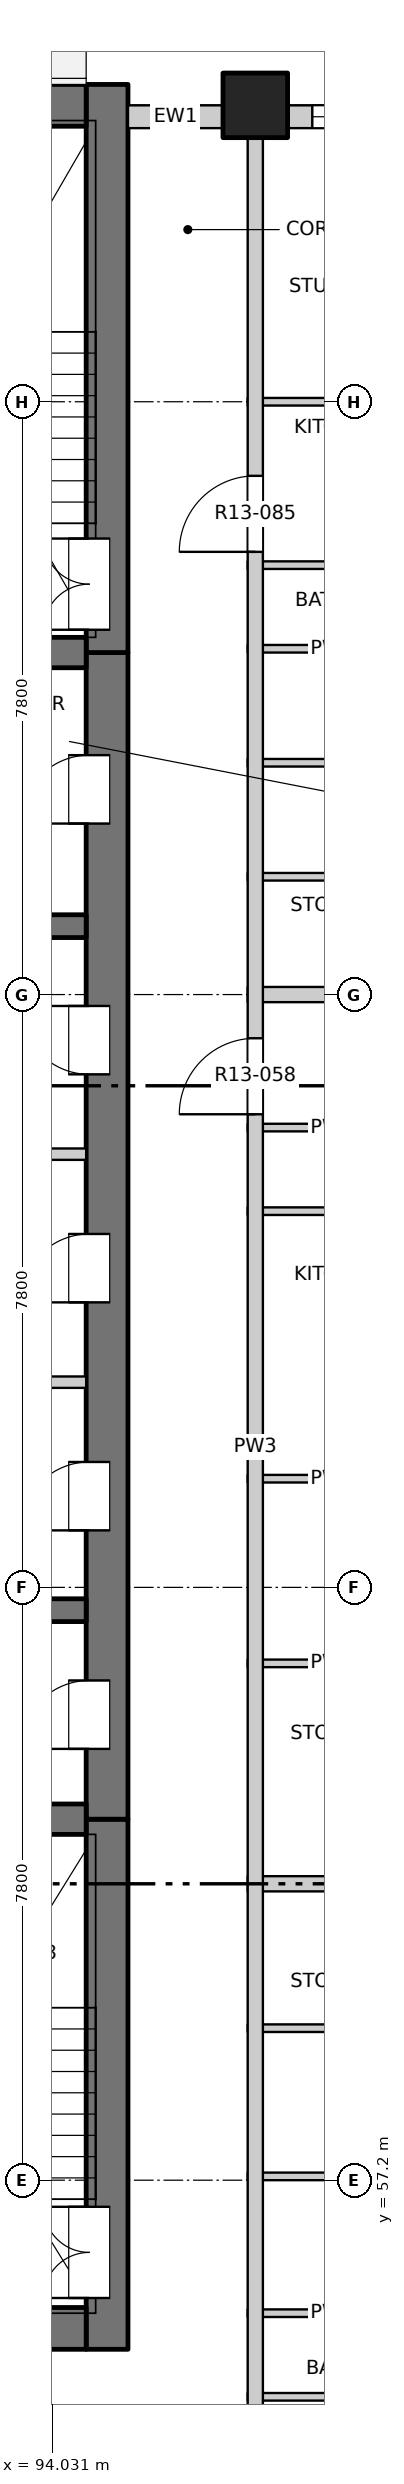
"""IFC4 building model, lengths in metres.
Left out: names, types, materials, properties, quantities, classifications, styles, units other than length and angle.
Written with IfcOpenShell. Run it as: python <this file> out.ifc"""

import sys

from ifc_helpers import new_model, si_unit, direction, frame, frame_2d, origin, origin_2d, place, context, subcontext, project, spatial, rectangle, extrude, element, fill, save


model = new_model("IFC4")
c1 = context("Model", 3, precision=1e-05, world=origin(), true_north=direction((0.0, 1.0)))
c2 = subcontext(c1, "Body", "Model", "MODEL_VIEW")
j1 = project(units=[si_unit("LENGTHUNIT", "METRE"), si_unit("PLANEANGLEUNIT", "RADIAN")], contexts=[c1])
p1 = place(None, origin())
s1 = spatial("IfcSite", under=j1, at=p1, CompositionType="ELEMENT")
p2 = place(p1, origin())
s2 = spatial("IfcBuilding", under=s1, at=p2, CompositionType="ELEMENT")
p3 = place(p2, frame((0.0, 0.0, 140.7)))
s3 = spatial("IfcBuildingStorey", under=s2, at=p3, CompositionType="ELEMENT", Elevation=140.7)
p4 = place(p3, frame((96.7, 84.5, -0.25), z_axis=(0.0, 0.0, 1.0), x_axis=(1.0, 0.0, 0.0)))
e1 = element("IfcColumn", 1, at=p4, inside=s3, PredefinedType="COLUMN", context=c2, shape_type="SweptSolid", body=[
    extrude(rectangle(XDim=0.85, YDim=0.85, at=origin_2d()), origin(), (0.0, 0.0, 1.0), 3.35),
])
p5 = place(p3, frame((94.75, 54.975, -0.25), z_axis=(0.0, 0.0, 1.0), x_axis=(0.0, 1.0, 0.0)))
e2 = element("IfcWall", 2, at=p5, inside=s3, PredefinedType="SOLIDWALL", context=c2, shape_type="SweptSolid", body=[
    extrude(rectangle(XDim=6.975, YDim=0.55, at=frame_2d((3.487, 0.0))), origin(), (0.0, 0.0, 1.0), 3.35),
])
p6 = place(p5, frame((0.675, 0.0, 0.25)))
e3 = element("IfcOpeningElement", 3, at=p6, cuts=e2, PredefinedType="OPENING", context=c2, shape_type="SweptSolid", body=[
    extrude(rectangle(XDim=1.2, YDim=2.1, at=frame_2d((0.6, 1.05))), frame((0.0, 0.285, 0.0), z_axis=(0.0, -1.0, 0.0), x_axis=(1.0, 0.0, 0.0)), (0.0, 0.0, 1.0), 0.57),
])
p7 = place(p3, frame((94.75, 61.95, -0.25), z_axis=(0.0, 0.0, 1.0), x_axis=(0.0, 1.0, 0.0)))
e4 = element("IfcWall", 4, at=p7, inside=s3, PredefinedType="SOLIDWALL", context=c2, shape_type="SweptSolid", body=[
    extrude(rectangle(XDim=15.35, YDim=0.55, at=frame_2d((7.675, 0.0))), origin(), (0.0, 0.0, 1.0), 3.35),
])
p8 = place(p7, frame((0.925, 0.0, 0.25)))
e5 = element("IfcOpeningElement", 5, at=p8, cuts=e4, PredefinedType="OPENING", context=c2, shape_type="SweptSolid", body=[
    extrude(rectangle(XDim=0.9, YDim=2.1, at=frame_2d((0.45, 1.05))), frame((0.0, 0.285, 0.0), z_axis=(0.0, -1.0, 0.0), x_axis=(1.0, 0.0, 0.0)), (0.0, 0.0, 1.0), 0.57),
])
p9 = place(p7, frame((3.8, 0.0, 0.25)))
e6 = element("IfcOpeningElement", 6, at=p9, cuts=e4, PredefinedType="OPENING", context=c2, shape_type="SweptSolid", body=[
    extrude(rectangle(XDim=0.9, YDim=2.1, at=frame_2d((0.45, 1.05))), frame((0.0, 0.285, 0.0), z_axis=(0.0, -1.0, 0.0), x_axis=(1.0, 0.0, 0.0)), (0.0, 0.0, 1.0), 0.57),
])
p10 = place(p7, frame((6.8, 0.0, 0.25)))
e7 = element("IfcOpeningElement", 7, at=p10, cuts=e4, PredefinedType="OPENING", context=c2, shape_type="SweptSolid", body=[
    extrude(rectangle(XDim=0.9, YDim=2.1, at=frame_2d((0.45, 1.05))), frame((0.0, 0.285, 0.0), z_axis=(0.0, -1.0, 0.0), x_axis=(1.0, 0.0, 0.0)), (0.0, 0.0, 1.0), 0.57),
])
p11 = place(p7, frame((9.8, 0.0, 0.25)))
e8 = element("IfcOpeningElement", 8, at=p11, cuts=e4, PredefinedType="OPENING", context=c2, shape_type="SweptSolid", body=[
    extrude(rectangle(XDim=0.9, YDim=2.1, at=frame_2d((0.45, 1.05))), frame((0.0, 0.285, 0.0), z_axis=(0.0, -1.0, 0.0), x_axis=(1.0, 0.0, 0.0)), (0.0, 0.0, 1.0), 0.57),
])
p12 = place(p7, frame((13.1, 0.0, 0.25)))
e9 = element("IfcOpeningElement", 9, at=p12, cuts=e4, PredefinedType="OPENING", context=c2, shape_type="SweptSolid", body=[
    extrude(rectangle(XDim=0.9, YDim=2.1, at=frame_2d((0.45, 1.05))), frame((0.0, 0.285, 0.0), z_axis=(0.0, -1.0, 0.0), x_axis=(1.0, 0.0, 0.0)), (0.0, 0.0, 1.0), 0.57),
])
p13 = place(p3, frame((94.75, 77.3, -0.25), z_axis=(0.0, 0.0, 1.0), x_axis=(0.0, 1.0, 0.0)))
e10 = element("IfcWall", 10, at=p13, inside=s3, PredefinedType="SOLIDWALL", context=c2, shape_type="SweptSolid", body=[
    extrude(rectangle(XDim=7.475, YDim=0.55, at=frame_2d((3.737, 0.0))), origin(), (0.0, 0.0, 1.0), 3.35),
])
p14 = place(p13, frame((0.3, 0.0, 0.25)))
e11 = element("IfcOpeningElement", 11, at=p14, cuts=e10, PredefinedType="OPENING", context=c2, shape_type="SweptSolid", body=[
    extrude(rectangle(XDim=1.2, YDim=2.1, at=frame_2d((0.6, 1.05))), frame((0.0, 0.285, 0.0), z_axis=(0.0, -1.0, 0.0), x_axis=(1.0, 0.0, 0.0)), (0.0, 0.0, 1.0), 0.57),
])
p15 = place(p3, frame((75.525, 55.25, -0.25), z_axis=(0.0, 0.0, 1.0), x_axis=(1.0, 0.0, 0.0)))
e12 = element("IfcWall", 12, at=p15, inside=s3, PredefinedType="SOLIDWALL", context=c2, shape_type="SweptSolid", body=[
    extrude(rectangle(XDim=18.95, YDim=0.55, at=frame_2d((9.475, 0.0))), origin(), (0.0, 0.0, 1.0), 3.35),
])
p16 = place(p15, frame((8.725, 0.0, 0.25)))
e13 = element("IfcOpeningElement", 13, at=p16, cuts=e12, PredefinedType="OPENING", context=c2, shape_type="SweptSolid", body=[
    extrude(rectangle(XDim=1.5, YDim=2.1, at=frame_2d((0.75, 1.05))), frame((0.0, 0.285, 0.0), z_axis=(0.0, -1.0, 0.0), x_axis=(1.0, 0.0, 0.0)), (0.0, 0.0, 1.0), 0.57),
])
p17 = place(p3, frame((75.525, 84.5, -0.25), z_axis=(0.0, 0.0, 1.0), x_axis=(1.0, 0.0, 0.0)))
e14 = element("IfcWall", 14, at=p17, inside=s3, PredefinedType="SOLIDWALL", context=c2, shape_type="SweptSolid", body=[
    extrude(rectangle(XDim=18.95, YDim=0.55, at=frame_2d((9.475, 0.0))), origin(), (0.0, 0.0, 1.0), 3.35),
])
p18 = place(p3, frame((90.7, 61.95, -0.25), z_axis=(0.0, 0.0, 1.0), x_axis=(1.0, 0.0, 0.0)))
e15 = element("IfcWall", 15, at=p18, inside=s3, PredefinedType="SOLIDWALL", context=c2, shape_type="SweptSolid", body=[
    extrude(rectangle(XDim=3.775, YDim=0.4, at=frame_2d((1.888, 0.0))), origin(), (0.0, 0.0, 1.0), 3.35),
])
for number, where, z_axis, x_axis in (
    (16, (90.7, 64.7, -0.25), (0.0, 0.0, 1.0), (1.0, 0.0, 0.0)),
    (17, (90.7, 73.7, -0.25), (0.0, 0.0, 1.0), (1.0, 0.0, 0.0)),
):
    element("IfcWall", number, at=place(p3, frame(where, z_axis=z_axis, x_axis=x_axis)), inside=s3, PredefinedType="SOLIDWALL", context=c2, shape_type="SweptSolid", body=[
        extrude(rectangle(XDim=3.775, YDim=0.3, at=frame_2d((1.888, 0.0))), origin(), (0.0, 0.0, 1.0), 3.35),
    ])
p19 = place(p3, frame((90.7, 77.3, -0.25), z_axis=(0.0, 0.0, 1.0), x_axis=(1.0, 0.0, 0.0)))
e18 = element("IfcWall", 18, at=p19, inside=s3, PredefinedType="SOLIDWALL", context=c2, shape_type="SweptSolid", body=[
    extrude(rectangle(XDim=3.775, YDim=0.4, at=frame_2d((1.888, 0.0))), origin(), (0.0, 0.0, 1.0), 3.35),
])
p20 = place(p3, frame((95.025, 84.35, 0.0), z_axis=(0.0, 0.0, 1.0), x_axis=(1.0, 0.0, 0.0)))
e19 = element("IfcWall", 19, at=p20, inside=s3, PredefinedType="SOLIDWALL", context=c2, shape_type="SweptSolid", body=[
    extrude(rectangle(XDim=1.25, YDim=0.3, at=frame_2d((0.625, 0.0))), origin(), (0.0, 0.0, 1.0), 3.1),
])
p21 = place(p3, frame((97.125, 84.35, 0.0), z_axis=(0.0, 0.0, 1.0), x_axis=(1.0, 0.0, 0.0)))
e20 = element("IfcWall", 20, at=p21, inside=s3, PredefinedType="SOLIDWALL", context=c2, shape_type="SweptSolid", body=[
    extrude(rectangle(XDim=3.475, YDim=0.3, at=frame_2d((1.738, 0.0))), origin(), (0.0, 0.0, 1.0), 3.1),
])
p22 = place(p21, frame((0.325, 0.0, 0.9)))
e21 = element("IfcOpeningElement", 21, at=p22, cuts=e20, PredefinedType="OPENING", context=c2, shape_type="SweptSolid", body=[
    extrude(rectangle(XDim=2.4, YDim=1.8, at=frame_2d((1.2, 0.9))), frame((0.0, 0.16, 0.0), z_axis=(0.0, -1.0, 0.0), x_axis=(1.0, 0.0, 0.0)), (0.0, 0.0, 1.0), 0.32),
])
for number, where, z_axis, x_axis in (
    (22, (96.6, 54.35, 0.0), (0.0, 0.0, 1.0), (1.0, 0.0, 0.0)),
    (23, (96.6, 55.45, 0.0), (0.0, 0.0, 1.0), (1.0, 0.0, 0.0)),
    (24, (96.6, 57.25, 0.0), (0.0, 0.0, 1.0), (1.0, 0.0, 0.0)),
    (25, (96.6, 59.2, 0.0), (0.0, 0.0, 1.0), (1.0, 0.0, 0.0)),
):
    element("IfcWall", number, at=place(p3, frame(where, z_axis=z_axis, x_axis=x_axis)), inside=s3, PredefinedType="PARTITIONING", context=c2, shape_type="SweptSolid", body=[
        extrude(rectangle(XDim=2.22, YDim=0.1, at=frame_2d((1.11, 0.0))), origin(), (0.0, 0.0, 1.0), 3.1),
    ])
p23 = place(p3, frame((96.6, 61.1, 0.0), z_axis=(0.0, 0.0, 1.0), x_axis=(1.0, 0.0, 0.0)))
e26 = element("IfcWall", 26, at=p23, inside=s3, PredefinedType="PARTITIONING", context=c2, shape_type="SweptSolid", body=[
    extrude(rectangle(XDim=7.6, YDim=0.2, at=frame_2d((3.8, 0.0))), origin(), (0.0, 0.0, 1.0), 3.1),
])
for number, where, z_axis, x_axis in (
    (27, (96.6, 64.0, 0.0), (0.0, 0.0, 1.0), (1.0, 0.0, 0.0)),
    (28, (96.6, 66.43, 0.0), (0.0, 0.0, 1.0), (1.0, 0.0, 0.0)),
):
    element("IfcWall", number, at=place(p3, frame(where, z_axis=z_axis, x_axis=x_axis)), inside=s3, PredefinedType="PARTITIONING", context=c2, shape_type="SweptSolid", body=[
        extrude(rectangle(XDim=2.22, YDim=0.1, at=frame_2d((1.11, 0.0))), origin(), (0.0, 0.0, 1.0), 3.1),
    ])
p24 = place(p3, frame((90.7, 67.7, 0.0), z_axis=(0.0, 0.0, 1.0), x_axis=(1.0, 0.0, 0.0)))
e29 = element("IfcWall", 29, at=p24, inside=s3, PredefinedType="PARTITIONING", context=c2, shape_type="SweptSolid", body=[
    extrude(rectangle(XDim=3.775, YDim=0.15, at=frame_2d((1.887, 0.0))), origin(), (0.0, 0.0, 1.0), 3.1),
])
p25 = place(p3, frame((96.6, 69.95, 0.0), z_axis=(0.0, 0.0, 1.0), x_axis=(1.0, 0.0, 0.0)))
e30 = element("IfcWall", 30, at=p25, inside=s3, PredefinedType="PARTITIONING", context=c2, shape_type="SweptSolid", body=[
    extrude(rectangle(XDim=2.22, YDim=0.1, at=frame_2d((1.11, 0.0))), origin(), (0.0, 0.0, 1.0), 3.1),
])
p26 = place(p3, frame((90.7, 70.7, 0.0), z_axis=(0.0, 0.0, 1.0), x_axis=(1.0, 0.0, 0.0)))
e31 = element("IfcWall", 31, at=p26, inside=s3, PredefinedType="PARTITIONING", context=c2, shape_type="SweptSolid", body=[
    extrude(rectangle(XDim=3.775, YDim=0.15, at=frame_2d((1.887, 0.0))), origin(), (0.0, 0.0, 1.0), 3.1),
])
p27 = place(p3, frame((96.6, 71.05, 0.0), z_axis=(0.0, 0.0, 1.0), x_axis=(1.0, 0.0, 0.0)))
e32 = element("IfcWall", 32, at=p27, inside=s3, PredefinedType="PARTITIONING", context=c2, shape_type="SweptSolid", body=[
    extrude(rectangle(XDim=2.22, YDim=0.1, at=frame_2d((1.11, 0.0))), origin(), (0.0, 0.0, 1.0), 3.1),
])
p28 = place(p3, frame((96.6, 72.8, 0.0), z_axis=(0.0, 0.0, 1.0), x_axis=(1.0, 0.0, 0.0)))
e33 = element("IfcWall", 33, at=p28, inside=s3, PredefinedType="PARTITIONING", context=c2, shape_type="SweptSolid", body=[
    extrude(rectangle(XDim=7.6, YDim=0.2, at=frame_2d((3.8, 0.0))), origin(), (0.0, 0.0, 1.0), 3.1),
])
for number, where, z_axis, x_axis in (
    (34, (96.6, 74.35, 0.0), (0.0, 0.0, 1.0), (1.0, 0.0, 0.0)),
    (35, (96.6, 75.85, 0.0), (0.0, 0.0, 1.0), (1.0, 0.0, 0.0)),
    (36, (96.6, 77.35, 0.0), (0.0, 0.0, 1.0), (1.0, 0.0, 0.0)),
    (37, (96.6, 78.45, 0.0), (0.0, 0.0, 1.0), (1.0, 0.0, 0.0)),
):
    element("IfcWall", number, at=place(p3, frame(where, z_axis=z_axis, x_axis=x_axis)), inside=s3, PredefinedType="PARTITIONING", context=c2, shape_type="SweptSolid", body=[
        extrude(rectangle(XDim=2.22, YDim=0.1, at=frame_2d((1.11, 0.0))), origin(), (0.0, 0.0, 1.0), 3.1),
    ])
p29 = place(p3, frame((96.6, 80.6, 0.0), z_axis=(0.0, 0.0, 1.0), x_axis=(1.0, 0.0, 0.0)))
e38 = element("IfcWall", 38, at=p29, inside=s3, PredefinedType="PARTITIONING", context=c2, shape_type="SweptSolid", body=[
    extrude(rectangle(XDim=7.6, YDim=0.1, at=frame_2d((3.8, 0.0))), origin(), (0.0, 0.0, 1.0), 3.1),
])
p30 = place(p29, frame((2.51, 0.0, 0.0)))
e39 = element("IfcOpeningElement", 39, at=p30, cuts=e38, PredefinedType="OPENING", context=c2, shape_type="SweptSolid", body=[
    extrude(rectangle(XDim=0.9, YDim=2.1, at=frame_2d((0.45, 1.05))), frame((0.0, 0.06, 0.0), z_axis=(0.0, -1.0, 0.0), x_axis=(1.0, 0.0, 0.0)), (0.0, 0.0, 1.0), 0.12),
])
p31 = place(p3, frame((96.7, 49.5, 0.0), z_axis=(0.0, 0.0, 1.0), x_axis=(0.0, 1.0, 0.0)))
e40 = element("IfcWall", 40, at=p31, inside=s3, PredefinedType="PARTITIONING", context=c2, shape_type="SweptSolid", body=[
    extrude(rectangle(XDim=34.7, YDim=0.2, at=frame_2d((17.35, 0.0))), origin(), (0.0, 0.0, 1.0), 3.1),
])
p32 = place(p31, frame((3.675, 0.0, 0.0)))
e41 = element("IfcOpeningElement", 41, at=p32, cuts=e40, PredefinedType="OPENING", context=c2, shape_type="SweptSolid", body=[
    extrude(rectangle(XDim=1.0, YDim=2.1, at=frame_2d((0.5, 1.05))), frame((0.0, 0.11, 0.0), z_axis=(0.0, -1.0, 0.0), x_axis=(1.0, 0.0, 0.0)), (0.0, 0.0, 1.0), 0.22),
])
p33 = place(p31, frame((21.725, 0.0, 0.0)))
e42 = element("IfcOpeningElement", 42, at=p33, cuts=e40, PredefinedType="OPENING", context=c2, shape_type="SweptSolid", body=[
    extrude(rectangle(XDim=1.0, YDim=2.1, at=frame_2d((0.5, 1.05))), frame((0.0, 0.11, 0.0), z_axis=(0.0, -1.0, 0.0), x_axis=(1.0, 0.0, 0.0)), (0.0, 0.0, 1.0), 0.22),
])
p34 = place(p31, frame((29.125, 0.0, 0.0)))
e43 = element("IfcOpeningElement", 43, at=p34, cuts=e40, PredefinedType="OPENING", context=c2, shape_type="SweptSolid", body=[
    extrude(rectangle(XDim=1.0, YDim=2.1, at=frame_2d((0.5, 1.05))), frame((0.0, 0.11, 0.0), z_axis=(0.0, -1.0, 0.0), x_axis=(1.0, 0.0, 0.0)), (0.0, 0.0, 1.0), 0.22),
])
p35 = place(p22, origin())
e44 = element("IfcWindow", 44, at=p35, inside=s3, PartitioningType="DOUBLE_PANEL_VERTICAL", PredefinedType="WINDOW", context=c2, shape_type="SweptSolid", body=[
    extrude(rectangle(XDim=2.4, YDim=1.8, at=frame_2d((1.2, 0.9))), frame((0.0, 0.03, 0.0), z_axis=(0.0, -1.0, 0.0), x_axis=(1.0, 0.0, 0.0)), (0.0, 0.0, 1.0), 0.06),
])
fill(e21, e44)
p36 = place(p6, origin())
e45 = element("IfcDoor", 45, at=p36, inside=s3, OperationType="DOUBLE_DOOR_SINGLE_SWING", PredefinedType="DOOR", context=c2, shape_type="SweptSolid", body=[
    extrude(rectangle(XDim=1.2, YDim=2.1, at=frame_2d((0.6, 1.05))), frame((0.0, 0.26, 0.0), z_axis=(0.0, -1.0, 0.0), x_axis=(1.0, 0.0, 0.0)), (0.0, 0.0, 1.0), 0.05),
])
fill(e3, e45)
p37 = place(p8, origin())
e46 = element("IfcDoor", 46, at=p37, inside=s3, OperationType="SINGLE_SWING_LEFT", PredefinedType="DOOR", context=c2, shape_type="SweptSolid", body=[
    extrude(rectangle(XDim=0.9, YDim=2.1, at=frame_2d((0.45, 1.05))), frame((0.0, 0.26, 0.0), z_axis=(0.0, -1.0, 0.0), x_axis=(1.0, 0.0, 0.0)), (0.0, 0.0, 1.0), 0.05),
])
fill(e5, e46)
p38 = place(p9, origin())
e47 = element("IfcDoor", 47, at=p38, inside=s3, OperationType="SINGLE_SWING_LEFT", PredefinedType="DOOR", context=c2, shape_type="SweptSolid", body=[
    extrude(rectangle(XDim=0.9, YDim=2.1, at=frame_2d((0.45, 1.05))), frame((0.0, 0.26, 0.0), z_axis=(0.0, -1.0, 0.0), x_axis=(1.0, 0.0, 0.0)), (0.0, 0.0, 1.0), 0.05),
])
fill(e6, e47)
p39 = place(p10, origin())
e48 = element("IfcDoor", 48, at=p39, inside=s3, OperationType="SINGLE_SWING_LEFT", PredefinedType="DOOR", context=c2, shape_type="SweptSolid", body=[
    extrude(rectangle(XDim=0.9, YDim=2.1, at=frame_2d((0.45, 1.05))), frame((0.0, 0.26, 0.0), z_axis=(0.0, -1.0, 0.0), x_axis=(1.0, 0.0, 0.0)), (0.0, 0.0, 1.0), 0.05),
])
fill(e7, e48)
p40 = place(p33, origin())
e49 = element("IfcDoor", 49, at=p40, inside=s3, OperationType="SINGLE_SWING_LEFT", PredefinedType="DOOR", context=c2, shape_type="SweptSolid", body=[
    extrude(rectangle(XDim=1.0, YDim=2.1, at=frame_2d((0.5, 1.05))), frame((0.0, 0.025, 0.0), z_axis=(0.0, -1.0, 0.0), x_axis=(1.0, 0.0, 0.0)), (0.0, 0.0, 1.0), 0.05),
])
fill(e42, e49)
p41 = place(p11, origin())
e50 = element("IfcDoor", 50, at=p41, inside=s3, OperationType="SINGLE_SWING_RIGHT", PredefinedType="DOOR", context=c2, shape_type="SweptSolid", body=[
    extrude(rectangle(XDim=0.9, YDim=2.1, at=frame_2d((0.45, 1.05))), frame((0.0, 0.26, 0.0), z_axis=(0.0, -1.0, 0.0), x_axis=(1.0, 0.0, 0.0)), (0.0, 0.0, 1.0), 0.05),
])
fill(e8, e50)
p42 = place(p12, origin())
e51 = element("IfcDoor", 51, at=p42, inside=s3, OperationType="SINGLE_SWING_LEFT", PredefinedType="DOOR", context=c2, shape_type="SweptSolid", body=[
    extrude(rectangle(XDim=0.9, YDim=2.1, at=frame_2d((0.45, 1.05))), frame((0.0, 0.26, 0.0), z_axis=(0.0, -1.0, 0.0), x_axis=(1.0, 0.0, 0.0)), (0.0, 0.0, 1.0), 0.05),
])
fill(e9, e51)
p43 = place(p14, origin())
e52 = element("IfcDoor", 52, at=p43, inside=s3, OperationType="DOUBLE_DOOR_SINGLE_SWING", PredefinedType="DOOR", context=c2, shape_type="SweptSolid", body=[
    extrude(rectangle(XDim=1.2, YDim=2.1, at=frame_2d((0.6, 1.05))), frame((0.0, 0.26, 0.0), z_axis=(0.0, -1.0, 0.0), x_axis=(1.0, 0.0, 0.0)), (0.0, 0.0, 1.0), 0.05),
])
fill(e11, e52)
p44 = place(p34, origin())
e53 = element("IfcDoor", 53, at=p44, inside=s3, OperationType="SINGLE_SWING_LEFT", PredefinedType="DOOR", context=c2, shape_type="SweptSolid", body=[
    extrude(rectangle(XDim=1.0, YDim=2.1, at=frame_2d((0.5, 1.05))), frame((0.0, 0.025, 0.0), z_axis=(0.0, -1.0, 0.0), x_axis=(1.0, 0.0, 0.0)), (0.0, 0.0, 1.0), 0.05),
])
fill(e43, e53)
save(model, sys.argv[1])
